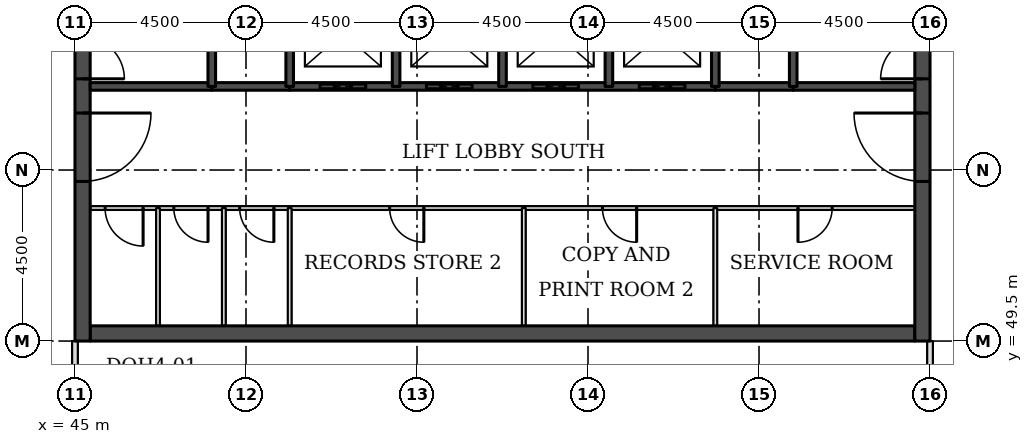
"""IFC4 building model, lengths in metres.
Left out: names, types, materials, properties, quantities, classifications, styles, units other than length and angle.
Written with IfcOpenShell. Run it as: python <this file> out.ifc"""

import sys

from ifc_helpers import new_model, si_unit, direction, frame, frame_2d, origin, place, context, subcontext, project, spatial, rectangle, extrude, element, fill, save


model = new_model("IFC4")
c1 = context("Model", 3, precision=1e-05, world=origin(), true_north=direction((0.0, 1.0)))
c2 = subcontext(c1, "Body", "Model", "MODEL_VIEW")
j1 = project(units=[si_unit("LENGTHUNIT", "METRE"), si_unit("PLANEANGLEUNIT", "RADIAN")], contexts=[c1])
p1 = place(None, origin())
s1 = spatial("IfcSite", under=j1, at=p1, CompositionType="ELEMENT")
p2 = place(p1, origin())
s2 = spatial("IfcBuilding", under=s1, at=p2, CompositionType="ELEMENT")
p3 = place(p2, frame((0.0, 0.0, 173.6)))
s3 = spatial("IfcBuildingStorey", under=s2, at=p3, CompositionType="ELEMENT", Elevation=173.6)
p4 = place(p3, frame((45.4, 49.7, 0.0), z_axis=(0.0, 0.0, 1.0), x_axis=(1.0, 0.0, 0.0)))
e1 = element("IfcWall", 1, at=p4, inside=s3, PredefinedType="SHEAR", context=c2, shape_type="SweptSolid", body=[
    extrude(rectangle(XDim=21.7, YDim=0.4, at=frame_2d((10.85, 0.0))), origin(), (0.0, 0.0, 1.0), 3.7),
])
p5 = place(p3, frame((45.2, 49.5, 0.0), z_axis=(0.0, 0.0, 1.0), x_axis=(0.0, 1.0, 0.0)))
e2 = element("IfcWall", 2, at=p5, inside=s3, PredefinedType="SHEAR", context=c2, shape_type="SweptSolid", body=[
    extrude(rectangle(XDim=22.5, YDim=0.4, at=frame_2d((11.25, 0.0))), origin(), (0.0, 0.0, 1.0), 3.7),
])
p6 = place(p5, frame((4.2, 0.0, 0.0)))
e3 = element("IfcOpeningElement", 3, at=p6, cuts=e2, PredefinedType="OPENING", context=c2, shape_type="SweptSolid", body=[
    extrude(rectangle(XDim=1.8, YDim=2.1, at=frame_2d((0.9, 1.05))), frame((0.0, 0.21, 0.0), z_axis=(0.0, -1.0, 0.0), x_axis=(1.0, 0.0, 0.0)), (0.0, 0.0, 1.0), 0.42),
])
p7 = place(p5, frame((6.9, 0.0, 0.0)))
e4 = element("IfcOpeningElement", 4, at=p7, cuts=e2, PredefinedType="OPENING", context=c2, shape_type="SweptSolid", body=[
    extrude(rectangle(XDim=1.1, YDim=2.1, at=frame_2d((0.55, 1.05))), frame((0.0, 0.21, 0.0), z_axis=(0.0, -1.0, 0.0), x_axis=(1.0, 0.0, 0.0)), (0.0, 0.0, 1.0), 0.42),
])
p8 = place(p5, frame((13.6, 0.0, 0.0)))
e5 = element("IfcOpeningElement", 5, at=p8, cuts=e2, PredefinedType="OPENING", context=c2, shape_type="SweptSolid", body=[
    extrude(rectangle(XDim=1.1, YDim=2.1, at=frame_2d((0.55, 1.05))), frame((0.0, 0.21, 0.0), z_axis=(0.0, -1.0, 0.0), x_axis=(1.0, 0.0, 0.0)), (0.0, 0.0, 1.0), 0.42),
])
p9 = place(p5, frame((16.5, 0.0, 0.0)))
e6 = element("IfcOpeningElement", 6, at=p9, cuts=e2, PredefinedType="OPENING", context=c2, shape_type="SweptSolid", body=[
    extrude(rectangle(XDim=1.8, YDim=2.1, at=frame_2d((0.9, 1.05))), frame((0.0, 0.21, 0.0), z_axis=(0.0, -1.0, 0.0), x_axis=(1.0, 0.0, 0.0)), (0.0, 0.0, 1.0), 0.42),
])
p10 = place(p3, frame((67.3, 49.5, 0.0), z_axis=(0.0, 0.0, 1.0), x_axis=(0.0, 1.0, 0.0)))
e7 = element("IfcWall", 7, at=p10, inside=s3, PredefinedType="SHEAR", context=c2, shape_type="SweptSolid", body=[
    extrude(rectangle(XDim=22.5, YDim=0.4, at=frame_2d((11.25, 0.0))), origin(), (0.0, 0.0, 1.0), 3.7),
])
p11 = place(p10, frame((4.2, 0.0, 0.0)))
e8 = element("IfcOpeningElement", 8, at=p11, cuts=e7, PredefinedType="OPENING", context=c2, shape_type="SweptSolid", body=[
    extrude(rectangle(XDim=1.8, YDim=2.1, at=frame_2d((0.9, 1.05))), frame((0.0, 0.21, 0.0), z_axis=(0.0, -1.0, 0.0), x_axis=(1.0, 0.0, 0.0)), (0.0, 0.0, 1.0), 0.42),
])
p12 = place(p10, frame((6.9, 0.0, 0.0)))
e9 = element("IfcOpeningElement", 9, at=p12, cuts=e7, PredefinedType="OPENING", context=c2, shape_type="SweptSolid", body=[
    extrude(rectangle(XDim=1.1, YDim=2.1, at=frame_2d((0.55, 1.05))), frame((0.0, 0.21, 0.0), z_axis=(0.0, -1.0, 0.0), x_axis=(1.0, 0.0, 0.0)), (0.0, 0.0, 1.0), 0.42),
])
p13 = place(p10, frame((13.6, 0.0, 0.0)))
e10 = element("IfcOpeningElement", 10, at=p13, cuts=e7, PredefinedType="OPENING", context=c2, shape_type="SweptSolid", body=[
    extrude(rectangle(XDim=1.1, YDim=2.1, at=frame_2d((0.55, 1.05))), frame((0.0, 0.21, 0.0), z_axis=(0.0, -1.0, 0.0), x_axis=(1.0, 0.0, 0.0)), (0.0, 0.0, 1.0), 0.42),
])
p14 = place(p10, frame((16.5, 0.0, 0.0)))
e11 = element("IfcOpeningElement", 11, at=p14, cuts=e7, PredefinedType="OPENING", context=c2, shape_type="SweptSolid", body=[
    extrude(rectangle(XDim=1.8, YDim=2.1, at=frame_2d((0.9, 1.05))), frame((0.0, 0.21, 0.0), z_axis=(0.0, -1.0, 0.0), x_axis=(1.0, 0.0, 0.0)), (0.0, 0.0, 1.0), 0.42),
])
p15 = place(p3, frame((67.5, 40.05, 0.0), z_axis=(0.0, 0.0, 1.0), x_axis=(0.0, 1.0, 0.0)))
e12 = element("IfcWall", 12, at=p15, inside=s3, PredefinedType="PARTITIONING", context=c2, shape_type="SweptSolid", body=[
    extrude(rectangle(XDim=9.45, YDim=0.15, at=frame_2d((4.725, 0.0))), origin(), (0.0, 0.0, 1.0), 3.022),
])
p16 = place(p3, frame((45.0, 48.0, 0.0), z_axis=(0.0, 0.0, 1.0), x_axis=(0.0, 1.0, 0.0)))
e13 = element("IfcWall", 13, at=p16, inside=s3, PredefinedType="PARTITIONING", context=c2, shape_type="SweptSolid", body=[
    extrude(rectangle(XDim=1.5, YDim=0.15, at=frame_2d((0.75, 0.0))), origin(), (0.0, 0.0, 1.0), 3.022),
])
p17 = place(p3, frame((45.4, 53.0, 0.0), z_axis=(0.0, 0.0, 1.0), x_axis=(1.0, 0.0, 0.0)))
e14 = element("IfcWall", 14, at=p17, inside=s3, PredefinedType="PARTITIONING", context=c2, shape_type="SweptSolid", body=[
    extrude(rectangle(XDim=21.7, YDim=0.1, at=frame_2d((10.85, 0.0))), origin(), (0.0, 0.0, 1.0), 3.55),
])
p18 = place(p17, frame((18.625, 0.0, 0.0)))
e15 = element("IfcOpeningElement", 15, at=p18, cuts=e14, PredefinedType="OPENING", context=c2, shape_type="SweptSolid", body=[
    extrude(rectangle(XDim=0.9, YDim=2.1, at=frame_2d((0.45, 1.05))), frame((0.0, 0.06, 0.0), z_axis=(0.0, -1.0, 0.0), x_axis=(1.0, 0.0, 0.0)), (0.0, 0.0, 1.0), 0.12),
])
p19 = place(p17, frame((0.393, 0.0, 0.0)))
e16 = element("IfcOpeningElement", 16, at=p19, cuts=e14, PredefinedType="OPENING", context=c2, shape_type="SweptSolid", body=[
    extrude(rectangle(XDim=1.0, YDim=2.1, at=frame_2d((0.5, 1.05))), frame((0.0, 0.06, 0.0), z_axis=(0.0, -1.0, 0.0), x_axis=(1.0, 0.0, 0.0)), (0.0, 0.0, 1.0), 0.12),
])
p20 = place(p17, frame((2.201, 0.0, 0.0)))
e17 = element("IfcOpeningElement", 17, at=p20, cuts=e14, PredefinedType="OPENING", context=c2, shape_type="SweptSolid", body=[
    extrude(rectangle(XDim=0.9, YDim=2.1, at=frame_2d((0.45, 1.05))), frame((0.0, 0.06, 0.0), z_axis=(0.0, -1.0, 0.0), x_axis=(1.0, 0.0, 0.0)), (0.0, 0.0, 1.0), 0.12),
])
p21 = place(p17, frame((3.934, 0.0, 0.0)))
e18 = element("IfcOpeningElement", 18, at=p21, cuts=e14, PredefinedType="OPENING", context=c2, shape_type="SweptSolid", body=[
    extrude(rectangle(XDim=0.9, YDim=2.1, at=frame_2d((0.45, 1.05))), frame((0.0, 0.06, 0.0), z_axis=(0.0, -1.0, 0.0), x_axis=(1.0, 0.0, 0.0)), (0.0, 0.0, 1.0), 0.12),
])
p22 = place(p17, frame((7.88, 0.0, 0.0)))
e19 = element("IfcOpeningElement", 19, at=p22, cuts=e14, PredefinedType="OPENING", context=c2, shape_type="SweptSolid", body=[
    extrude(rectangle(XDim=0.9, YDim=2.1, at=frame_2d((0.45, 1.05))), frame((0.0, 0.06, 0.0), z_axis=(0.0, -1.0, 0.0), x_axis=(1.0, 0.0, 0.0)), (0.0, 0.0, 1.0), 0.12),
])
p23 = place(p17, frame((13.48, 0.0, 0.0)))
e20 = element("IfcOpeningElement", 20, at=p23, cuts=e14, PredefinedType="OPENING", context=c2, shape_type="SweptSolid", body=[
    extrude(rectangle(XDim=0.9, YDim=2.1, at=frame_2d((0.45, 1.05))), frame((0.0, 0.06, 0.0), z_axis=(0.0, -1.0, 0.0), x_axis=(1.0, 0.0, 0.0)), (0.0, 0.0, 1.0), 0.12),
])
for number, where, z_axis, x_axis in (
    (21, (48.6, 56.2, 0.0), (0.0, 0.0, 1.0), (1.0, 0.0, 0.0)),
    (22, (61.85, 56.2, 0.0), (0.0, 0.0, 1.0), (1.0, 0.0, 0.0)),
):
    element("IfcWall", number, at=place(p3, frame(where, z_axis=z_axis, x_axis=x_axis)), inside=s3, PredefinedType="SOLIDWALL", context=c2, shape_type="SweptSolid", body=[
        extrude(rectangle(XDim=2.05, YDim=0.2, at=frame_2d((1.025, 0.0))), origin(), (0.0, 0.0, 1.0), 3.55),
    ])
p24 = place(p3, frame((45.4, 56.2, 0.0), z_axis=(0.0, 0.0, 1.0), x_axis=(1.0, 0.0, 0.0)))
e23 = element("IfcWall", 23, at=p24, inside=s3, PredefinedType="SOLIDWALL", context=c2, shape_type="SweptSolid", body=[
    extrude(rectangle(XDim=3.2, YDim=0.2, at=frame_2d((1.6, 0.0))), origin(), (0.0, 0.0, 1.0), 3.55),
])
p25 = place(p3, frame((50.65, 56.2, 0.0), z_axis=(0.0, 0.0, 1.0), x_axis=(1.0, 0.0, 0.0)))
e24 = element("IfcWall", 24, at=p25, inside=s3, PredefinedType="SOLIDWALL", context=c2, shape_type="SweptSolid", body=[
    extrude(rectangle(XDim=11.2, YDim=0.2, at=frame_2d((5.6, 0.0))), origin(), (0.0, 0.0, 1.0), 3.55),
])
p26 = place(p25, frame((0.8, 0.0, 0.0)))
e25 = element("IfcOpeningElement", 25, at=p26, cuts=e24, PredefinedType="OPENING", context=c2, shape_type="SweptSolid", body=[
    extrude(rectangle(XDim=1.2, YDim=2.1, at=frame_2d((0.6, 1.05))), frame((0.0, 0.11, 0.0), z_axis=(0.0, -1.0, 0.0), x_axis=(1.0, 0.0, 0.0)), (0.0, 0.0, 1.0), 0.22),
])
p27 = place(p25, frame((3.6, 0.0, 0.0)))
e26 = element("IfcOpeningElement", 26, at=p27, cuts=e24, PredefinedType="OPENING", context=c2, shape_type="SweptSolid", body=[
    extrude(rectangle(XDim=1.2, YDim=2.1, at=frame_2d((0.6, 1.05))), frame((0.0, 0.11, 0.0), z_axis=(0.0, -1.0, 0.0), x_axis=(1.0, 0.0, 0.0)), (0.0, 0.0, 1.0), 0.22),
])
p28 = place(p25, frame((6.4, 0.0, 0.0)))
e27 = element("IfcOpeningElement", 27, at=p28, cuts=e24, PredefinedType="OPENING", context=c2, shape_type="SweptSolid", body=[
    extrude(rectangle(XDim=1.2, YDim=2.1, at=frame_2d((0.6, 1.05))), frame((0.0, 0.11, 0.0), z_axis=(0.0, -1.0, 0.0), x_axis=(1.0, 0.0, 0.0)), (0.0, 0.0, 1.0), 0.22),
])
p29 = place(p25, frame((9.2, 0.0, 0.0)))
e28 = element("IfcOpeningElement", 28, at=p29, cuts=e24, PredefinedType="OPENING", context=c2, shape_type="SweptSolid", body=[
    extrude(rectangle(XDim=1.2, YDim=2.1, at=frame_2d((0.6, 1.05))), frame((0.0, 0.11, 0.0), z_axis=(0.0, -1.0, 0.0), x_axis=(1.0, 0.0, 0.0)), (0.0, 0.0, 1.0), 0.22),
])
p30 = place(p3, frame((63.9, 56.2, 0.0), z_axis=(0.0, 0.0, 1.0), x_axis=(1.0, 0.0, 0.0)))
e29 = element("IfcWall", 29, at=p30, inside=s3, PredefinedType="SOLIDWALL", context=c2, shape_type="SweptSolid", body=[
    extrude(rectangle(XDim=3.2, YDim=0.2, at=frame_2d((1.6, 0.0))), origin(), (0.0, 0.0, 1.0), 3.55),
])
p31 = place(p3, frame((47.185, 49.9, 0.0), z_axis=(0.0, 0.0, 1.0), x_axis=(0.0, 1.0, 0.0)))
e30 = element("IfcWall", 30, at=p31, inside=s3, PredefinedType="PARTITIONING", context=c2, shape_type="SweptSolid", body=[
    extrude(rectangle(XDim=3.1, YDim=0.1, at=frame_2d((1.55, 0.0))), origin(), (0.0, 0.0, 1.0), 3.55),
])
p32 = place(p3, frame((48.6, 56.2, 0.0), z_axis=(0.0, 0.0, 1.0), x_axis=(0.0, 1.0, 0.0)))
e31 = element("IfcWall", 31, at=p32, inside=s3, PredefinedType="SOLIDWALL", context=c2, shape_type="SweptSolid", body=[
    extrude(rectangle(XDim=5.8, YDim=0.2, at=frame_2d((2.9, 0.0))), origin(), (0.0, 0.0, 1.0), 3.55),
])
for number, where, z_axis, x_axis in (
    (32, (48.917, 49.9, 0.0), (0.0, 0.0, 1.0), (0.0, 1.0, 0.0)),
    (33, (50.65, 49.9, 0.0), (0.0, 0.0, 1.0), (0.0, 1.0, 0.0)),
):
    element("IfcWall", number, at=place(p3, frame(where, z_axis=z_axis, x_axis=x_axis)), inside=s3, PredefinedType="PARTITIONING", context=c2, shape_type="SweptSolid", body=[
        extrude(rectangle(XDim=3.1, YDim=0.1, at=frame_2d((1.55, 0.0))), origin(), (0.0, 0.0, 1.0), 3.55),
    ])
for number, where, z_axis, x_axis in (
    (34, (50.65, 56.2, 0.0), (0.0, 0.0, 1.0), (0.0, 1.0, 0.0)),
    (35, (53.45, 56.2, 0.0), (0.0, 0.0, 1.0), (0.0, 1.0, 0.0)),
    (36, (56.25, 56.2, 0.0), (0.0, 0.0, 1.0), (0.0, 1.0, 0.0)),
):
    element("IfcWall", number, at=place(p3, frame(where, z_axis=z_axis, x_axis=x_axis)), inside=s3, PredefinedType="SOLIDWALL", context=c2, shape_type="SweptSolid", body=[
        extrude(rectangle(XDim=2.8, YDim=0.2, at=frame_2d((1.4, 0.0))), origin(), (0.0, 0.0, 1.0), 3.55),
    ])
p33 = place(p3, frame((56.81, 49.9, 0.0), z_axis=(0.0, 0.0, 1.0), x_axis=(0.0, 1.0, 0.0)))
e37 = element("IfcWall", 37, at=p33, inside=s3, PredefinedType="PARTITIONING", context=c2, shape_type="SweptSolid", body=[
    extrude(rectangle(XDim=3.1, YDim=0.1, at=frame_2d((1.55, 0.0))), origin(), (0.0, 0.0, 1.0), 3.55),
])
p34 = place(p3, frame((59.05, 56.2, 0.0), z_axis=(0.0, 0.0, 1.0), x_axis=(0.0, 1.0, 0.0)))
e38 = element("IfcWall", 38, at=p34, inside=s3, PredefinedType="SOLIDWALL", context=c2, shape_type="SweptSolid", body=[
    extrude(rectangle(XDim=2.8, YDim=0.2, at=frame_2d((1.4, 0.0))), origin(), (0.0, 0.0, 1.0), 3.55),
])
p35 = place(p3, frame((61.85, 49.9, 0.0), z_axis=(0.0, 0.0, 1.0), x_axis=(0.0, 1.0, 0.0)))
e39 = element("IfcWall", 39, at=p35, inside=s3, PredefinedType="PARTITIONING", context=c2, shape_type="SweptSolid", body=[
    extrude(rectangle(XDim=3.1, YDim=0.1, at=frame_2d((1.55, 0.0))), origin(), (0.0, 0.0, 1.0), 3.55),
])
p36 = place(p3, frame((61.85, 56.2, 0.0), z_axis=(0.0, 0.0, 1.0), x_axis=(0.0, 1.0, 0.0)))
e40 = element("IfcWall", 40, at=p36, inside=s3, PredefinedType="SOLIDWALL", context=c2, shape_type="SweptSolid", body=[
    extrude(rectangle(XDim=2.8, YDim=0.2, at=frame_2d((1.4, 0.0))), origin(), (0.0, 0.0, 1.0), 3.55),
])
p37 = place(p3, frame((63.9, 56.2, 0.0), z_axis=(0.0, 0.0, 1.0), x_axis=(0.0, 1.0, 0.0)))
e41 = element("IfcWall", 41, at=p37, inside=s3, PredefinedType="SOLIDWALL", context=c2, shape_type="SweptSolid", body=[
    extrude(rectangle(XDim=5.8, YDim=0.2, at=frame_2d((2.9, 0.0))), origin(), (0.0, 0.0, 1.0), 3.55),
])
p38 = place(p26, origin())
e42 = element("IfcDoor", 42, at=p38, inside=s3, OperationType="DOUBLE_DOOR_SLIDING", PredefinedType="DOOR", context=c2, shape_type="SweptSolid", body=[
    extrude(rectangle(XDim=1.2, YDim=2.1, at=frame_2d((0.6, 1.05))), frame((0.0, 0.025, 0.0), z_axis=(0.0, -1.0, 0.0), x_axis=(1.0, 0.0, 0.0)), (0.0, 0.0, 1.0), 0.05),
])
fill(e25, e42)
p39 = place(p27, origin())
e43 = element("IfcDoor", 43, at=p39, inside=s3, OperationType="DOUBLE_DOOR_SLIDING", PredefinedType="DOOR", context=c2, shape_type="SweptSolid", body=[
    extrude(rectangle(XDim=1.2, YDim=2.1, at=frame_2d((0.6, 1.05))), frame((0.0, 0.025, 0.0), z_axis=(0.0, -1.0, 0.0), x_axis=(1.0, 0.0, 0.0)), (0.0, 0.0, 1.0), 0.05),
])
fill(e26, e43)
p40 = place(p28, origin())
e44 = element("IfcDoor", 44, at=p40, inside=s3, OperationType="DOUBLE_DOOR_SLIDING", PredefinedType="DOOR", context=c2, shape_type="SweptSolid", body=[
    extrude(rectangle(XDim=1.2, YDim=2.1, at=frame_2d((0.6, 1.05))), frame((0.0, 0.025, 0.0), z_axis=(0.0, -1.0, 0.0), x_axis=(1.0, 0.0, 0.0)), (0.0, 0.0, 1.0), 0.05),
])
fill(e27, e44)
p41 = place(p29, origin())
e45 = element("IfcDoor", 45, at=p41, inside=s3, OperationType="DOUBLE_DOOR_SLIDING", PredefinedType="DOOR", context=c2, shape_type="SweptSolid", body=[
    extrude(rectangle(XDim=1.2, YDim=2.1, at=frame_2d((0.6, 1.05))), frame((0.0, 0.025, 0.0), z_axis=(0.0, -1.0, 0.0), x_axis=(1.0, 0.0, 0.0)), (0.0, 0.0, 1.0), 0.05),
])
fill(e28, e45)
p42 = place(p6, frame((1.8, 0.0, 0.0), z_axis=(0.0, 0.0, 1.0), x_axis=(-1.0, 0.0, 0.0)))
e46 = element("IfcDoor", 46, at=p42, inside=s3, OperationType="SINGLE_SWING_LEFT", PredefinedType="DOOR", context=c2, shape_type="SweptSolid", body=[
    extrude(rectangle(XDim=1.8, YDim=2.1, at=frame_2d((0.9, 1.05))), frame((0.0, 0.025, 0.0), z_axis=(0.0, -1.0, 0.0), x_axis=(1.0, 0.0, 0.0)), (0.0, 0.0, 1.0), 0.05),
])
fill(e3, e46)
p43 = place(p7, frame((1.1, 0.0, 0.0), z_axis=(0.0, 0.0, 1.0), x_axis=(-1.0, 0.0, 0.0)))
e47 = element("IfcDoor", 47, at=p43, inside=s3, OperationType="SINGLE_SWING_RIGHT", PredefinedType="DOOR", context=c2, shape_type="SweptSolid", body=[
    extrude(rectangle(XDim=1.1, YDim=2.1, at=frame_2d((0.55, 1.05))), frame((0.0, 0.025, 0.0), z_axis=(0.0, -1.0, 0.0), x_axis=(1.0, 0.0, 0.0)), (0.0, 0.0, 1.0), 0.05),
])
fill(e4, e47)
p44 = place(p11, origin())
e48 = element("IfcDoor", 48, at=p44, inside=s3, OperationType="SINGLE_SWING_RIGHT", PredefinedType="DOOR", context=c2, shape_type="SweptSolid", body=[
    extrude(rectangle(XDim=1.8, YDim=2.1, at=frame_2d((0.9, 1.05))), frame((0.0, 0.025, 0.0), z_axis=(0.0, -1.0, 0.0), x_axis=(1.0, 0.0, 0.0)), (0.0, 0.0, 1.0), 0.05),
])
fill(e8, e48)
p45 = place(p12, origin())
e49 = element("IfcDoor", 49, at=p45, inside=s3, OperationType="SINGLE_SWING_LEFT", PredefinedType="DOOR", context=c2, shape_type="SweptSolid", body=[
    extrude(rectangle(XDim=1.1, YDim=2.1, at=frame_2d((0.55, 1.05))), frame((0.0, 0.025, 0.0), z_axis=(0.0, -1.0, 0.0), x_axis=(1.0, 0.0, 0.0)), (0.0, 0.0, 1.0), 0.05),
])
fill(e9, e49)
p46 = place(p18, frame((0.9, 0.0, 0.0), z_axis=(0.0, 0.0, 1.0), x_axis=(-1.0, 0.0, 0.0)))
e50 = element("IfcDoor", 50, at=p46, inside=s3, OperationType="SINGLE_SWING_RIGHT", PredefinedType="DOOR", context=c2, shape_type="SweptSolid", body=[
    extrude(rectangle(XDim=0.9, YDim=2.1, at=frame_2d((0.45, 1.05))), frame((0.0, 0.025, 0.0), z_axis=(0.0, -1.0, 0.0), x_axis=(1.0, 0.0, 0.0)), (0.0, 0.0, 1.0), 0.05),
])
fill(e15, e50)
p47 = place(p19, frame((1.0, 0.0, 0.0), z_axis=(0.0, 0.0, 1.0), x_axis=(-1.0, 0.0, 0.0)))
e51 = element("IfcDoor", 51, at=p47, inside=s3, OperationType="SINGLE_SWING_LEFT", PredefinedType="DOOR", context=c2, shape_type="SweptSolid", body=[
    extrude(rectangle(XDim=1.0, YDim=2.1, at=frame_2d((0.5, 1.05))), frame((0.0, 0.025, 0.0), z_axis=(0.0, -1.0, 0.0), x_axis=(1.0, 0.0, 0.0)), (0.0, 0.0, 1.0), 0.05),
])
fill(e16, e51)
p48 = place(p20, frame((0.9, 0.0, 0.0), z_axis=(0.0, 0.0, 1.0), x_axis=(-1.0, 0.0, 0.0)))
e52 = element("IfcDoor", 52, at=p48, inside=s3, OperationType="SINGLE_SWING_LEFT", PredefinedType="DOOR", context=c2, shape_type="SweptSolid", body=[
    extrude(rectangle(XDim=0.9, YDim=2.1, at=frame_2d((0.45, 1.05))), frame((0.0, 0.025, 0.0), z_axis=(0.0, -1.0, 0.0), x_axis=(1.0, 0.0, 0.0)), (0.0, 0.0, 1.0), 0.05),
])
fill(e17, e52)
p49 = place(p21, frame((0.9, 0.0, 0.0), z_axis=(0.0, 0.0, 1.0), x_axis=(-1.0, 0.0, 0.0)))
e53 = element("IfcDoor", 53, at=p49, inside=s3, OperationType="SINGLE_SWING_LEFT", PredefinedType="DOOR", context=c2, shape_type="SweptSolid", body=[
    extrude(rectangle(XDim=0.9, YDim=2.1, at=frame_2d((0.45, 1.05))), frame((0.0, 0.025, 0.0), z_axis=(0.0, -1.0, 0.0), x_axis=(1.0, 0.0, 0.0)), (0.0, 0.0, 1.0), 0.05),
])
fill(e18, e53)
p50 = place(p22, frame((0.9, 0.0, 0.0), z_axis=(0.0, 0.0, 1.0), x_axis=(-1.0, 0.0, 0.0)))
e54 = element("IfcDoor", 54, at=p50, inside=s3, OperationType="SINGLE_SWING_LEFT", PredefinedType="DOOR", context=c2, shape_type="SweptSolid", body=[
    extrude(rectangle(XDim=0.9, YDim=2.1, at=frame_2d((0.45, 1.05))), frame((0.0, 0.025, 0.0), z_axis=(0.0, -1.0, 0.0), x_axis=(1.0, 0.0, 0.0)), (0.0, 0.0, 1.0), 0.05),
])
fill(e19, e54)
p51 = place(p23, frame((0.9, 0.0, 0.0), z_axis=(0.0, 0.0, 1.0), x_axis=(-1.0, 0.0, 0.0)))
e55 = element("IfcDoor", 55, at=p51, inside=s3, OperationType="SINGLE_SWING_LEFT", PredefinedType="DOOR", context=c2, shape_type="SweptSolid", body=[
    extrude(rectangle(XDim=0.9, YDim=2.1, at=frame_2d((0.45, 1.05))), frame((0.0, 0.025, 0.0), z_axis=(0.0, -1.0, 0.0), x_axis=(1.0, 0.0, 0.0)), (0.0, 0.0, 1.0), 0.05),
])
fill(e20, e55)
save(model, sys.argv[1])
